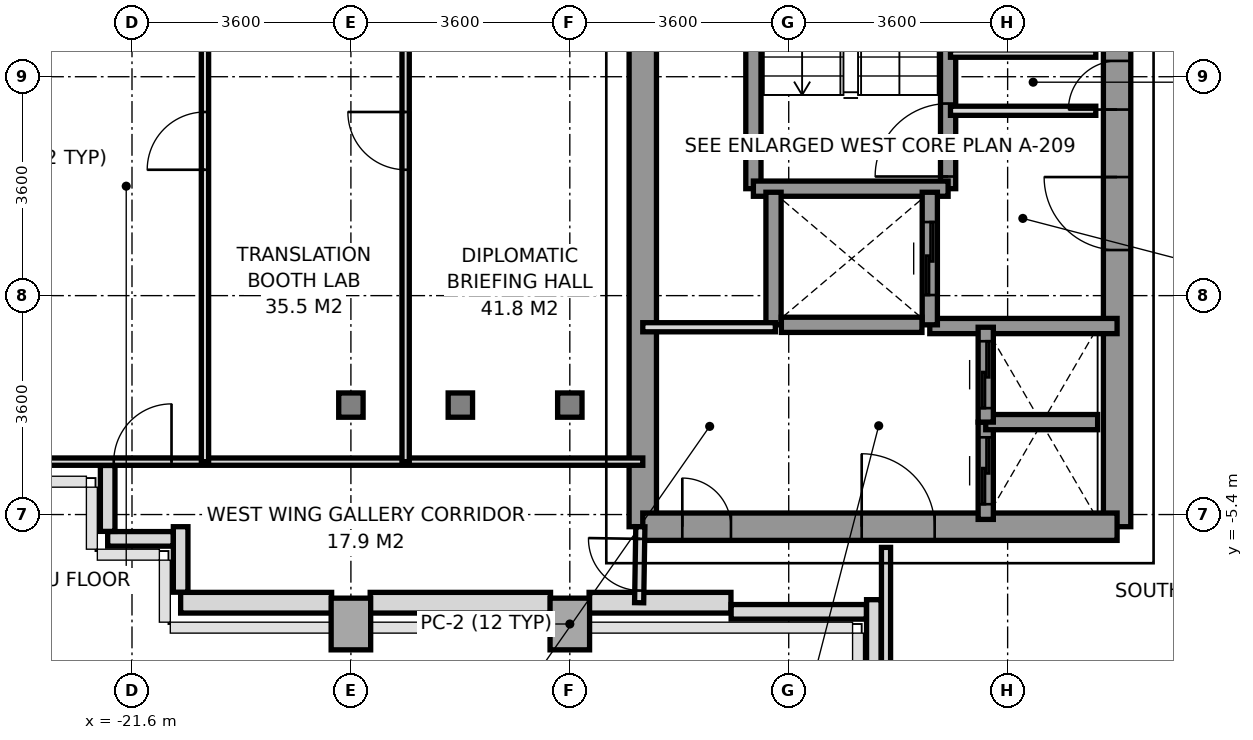
"""IFC4 building model, lengths in metres.
Left out: names, types, materials, properties, quantities, classifications, styles, units other than length and angle.
Written with IfcOpenShell. Run it as: python <this file> out.ifc"""

import sys

from ifc_helpers import new_model, si_unit, direction, frame, frame_2d, origin, origin_2d, place, context, subcontext, project, spatial, rectangle, i_section, extrude, source, transform, mapped, element, fill, save


model = new_model("IFC4")
c1 = context("Model", 3, precision=1e-05, world=origin(), true_north=direction((0.0, 1.0)))
c2 = subcontext(c1, "Body", "Model", "MODEL_VIEW")
j1 = project(units=[si_unit("LENGTHUNIT", "METRE"), si_unit("PLANEANGLEUNIT", "RADIAN")], contexts=[c1])
p1 = place(None, origin())
s1 = spatial("IfcSite", under=j1, at=p1, CompositionType="ELEMENT")
p2 = place(p1, origin())
s2 = spatial("IfcBuilding", under=s1, at=p2, CompositionType="ELEMENT")
p3 = place(p2, frame((0.0, 0.0, 117.6)))
s3 = spatial("IfcBuildingStorey", under=s2, at=p3, CompositionType="ELEMENT", Elevation=117.6)
m1 = source(origin(), c2, "Body", "SweptSolid", [
    extrude(rectangle(XDim=0.65, YDim=0.85, at=origin_2d()), origin(), (0.0, 0.0, 1.0), 3.2),
])
p4 = place(p3, frame((-18.0, -7.2, 0.0), z_axis=(0.0, 0.0, 1.0), x_axis=(1.0, 0.0, 0.0)))
e1 = element("IfcColumn", 1, at=p4, inside=s3, PredefinedType="COLUMN", context=c2, shape_type="MappedRepresentation", body=[
    mapped(m1, transform((0.0, 0.0, 0.0), x_axis=(1.0, 0.0, 0.0), y_axis=(0.0, 1.0, 0.0), z_axis=(0.0, 0.0, 1.0), scale=1.0)),
])
m2 = source(origin(), c2, "Body", "SweptSolid", [
    extrude(i_section(OverallWidth=0.401, OverallDepth=0.399, WebThickness=0.02, FlangeThickness=0.032, at=origin_2d()), origin(), (0.0, 0.0, 1.0), 3.2),
])
for number, where, z_axis, x_axis in (
    (2, (-18.0, -3.6, 0.0), (0.0, 0.0, 1.0), (1.0, 0.0, 0.0)),
    (3, (-16.2, -3.6, 0.0), (0.0, 0.0, 1.0), (1.0, 0.0, 0.0)),
):
    element("IfcColumn", number, at=place(p3, frame(where, z_axis=z_axis, x_axis=x_axis)), inside=s3, PredefinedType="COLUMN", context=c2, shape_type="MappedRepresentation", body=[
        mapped(m2, transform((0.0, 0.0, 0.0), x_axis=(1.0, 0.0, 0.0), y_axis=(0.0, 1.0, 0.0), z_axis=(0.0, 0.0, 1.0), scale=1.0)),
    ])
p5 = place(p3, frame((-14.4, -7.2, 0.0), z_axis=(0.0, 0.0, 1.0), x_axis=(1.0, 0.0, 0.0)))
e4 = element("IfcColumn", 4, at=p5, inside=s3, PredefinedType="COLUMN", context=c2, shape_type="MappedRepresentation", body=[
    mapped(m1, transform((0.0, 0.0, 0.0), x_axis=(1.0, 0.0, 0.0), y_axis=(0.0, 1.0, 0.0), z_axis=(0.0, 0.0, 1.0), scale=1.0)),
])
p6 = place(p3, frame((-14.4, -3.6, 0.0), z_axis=(0.0, 0.0, 1.0), x_axis=(1.0, 0.0, 0.0)))
e5 = element("IfcColumn", 5, at=p6, inside=s3, PredefinedType="COLUMN", context=c2, shape_type="MappedRepresentation", body=[
    mapped(m2, transform((0.0, 0.0, 0.0), x_axis=(1.0, 0.0, 0.0), y_axis=(0.0, 1.0, 0.0), z_axis=(0.0, 0.0, 1.0), scale=1.0)),
])
p7 = place(p3, frame((-20.8, -6.85, 0.0), z_axis=(0.0, 0.0, 1.0), x_axis=(1.0, 0.0, 0.0)))
e6 = element("IfcWall", 6, at=p7, inside=s3, PredefinedType="SOLIDWALL", context=c2, shape_type="SweptSolid", body=[
    extrude(rectangle(XDim=2.483, YDim=0.34, at=frame_2d((1.242, 0.0))), origin(), (0.0, 0.0, 1.0), 3.2),
])
p8 = place(p3, frame((-17.683, -6.85, 0.0), z_axis=(0.0, 0.0, 1.0), x_axis=(1.0, 0.0, 0.0)))
e7 = element("IfcWall", 7, at=p8, inside=s3, PredefinedType="SOLIDWALL", context=c2, shape_type="SweptSolid", body=[
    extrude(rectangle(XDim=2.966, YDim=0.34, at=frame_2d((1.483, 0.0))), origin(), (0.0, 0.0, 1.0), 2.45),
])
p9 = place(p3, frame((-14.083, -6.85, 0.0), z_axis=(0.0, 0.0, 1.0), x_axis=(1.0, 0.0, 0.0)))
e8 = element("IfcWall", 8, at=p9, inside=s3, PredefinedType="SOLIDWALL", context=c2, shape_type="SweptSolid", body=[
    extrude(rectangle(XDim=2.333, YDim=0.34, at=frame_2d((1.167, 0.0))), origin(), (0.0, 0.0, 1.0), 3.2),
])
p10 = place(p3, frame((-9.4, -8.472, 0.0), z_axis=(0.0, 0.0, 1.0), x_axis=(0.0, 1.0, 0.0)))
e9 = element("IfcWall", 9, at=p10, inside=s3, PredefinedType="PARAPET", context=c2, shape_type="SweptSolid", body=[
    extrude(rectangle(XDim=1.672, YDim=0.24, at=frame_2d((0.836, 0.0))), origin(), (0.0, 0.0, 1.0), 1.15),
])
p11 = place(p3, frame((-9.523, -7.0, 0.0), z_axis=(0.0, 0.0, 1.0), x_axis=(-1.0, 0.0, 0.0)))
e10 = element("IfcWall", 10, at=p11, inside=s3, PredefinedType="PARAPET", context=c2, shape_type="SweptSolid", body=[
    extrude(rectangle(XDim=2.224, YDim=0.24, at=frame_2d((1.112, 0.0))), origin(), (0.0, 0.0, 1.0), 1.15),
])
for number, where, z_axis, x_axis in (
    (11, (-20.8, -6.677, 0.0), (0.0, 0.0, 1.0), (0.0, 1.0, 0.0)),
    (12, (-20.923, -5.8, 0.0), (0.0, 0.0, 1.0), (-1.0, 0.0, 0.0)),
):
    element("IfcWall", number, at=place(p3, frame(where, z_axis=z_axis, x_axis=x_axis)), inside=s3, PredefinedType="PARAPET", context=c2, shape_type="SweptSolid", body=[
        extrude(rectangle(XDim=1.077, YDim=0.24, at=frame_2d((0.539, 0.0))), origin(), (0.0, 0.0, 1.0), 1.15),
    ])
p12 = place(p3, frame((-22.0, -5.677, 0.0), z_axis=(0.0, 0.0, 1.0), x_axis=(0.0, 1.0, 0.0)))
e13 = element("IfcWall", 13, at=p12, inside=s3, PredefinedType="PARAPET", context=c2, shape_type="SweptSolid", body=[
    extrude(rectangle(XDim=1.084, YDim=0.24, at=frame_2d((0.542, 0.0))), origin(), (0.0, 0.0, 1.0), 1.15),
])
p13 = place(p3, frame((-13.2, -5.6, 0.0), z_axis=(0.0, 0.0, 1.0), x_axis=(0.0, 1.0, 0.0)))
e14 = element("IfcWall", 14, at=p13, inside=s3, PredefinedType="SHEAR", context=c2, shape_type="SweptSolid", body=[
    extrude(rectangle(XDim=11.2, YDim=0.45, at=frame_2d((5.6, 0.0))), origin(), (0.0, 0.0, 1.0), 3.2),
])
p14 = place(p3, frame((-5.4, -5.6, 0.0), z_axis=(0.0, 0.0, 1.0), x_axis=(0.0, 1.0, 0.0)))
e15 = element("IfcWall", 15, at=p14, inside=s3, PredefinedType="SHEAR", context=c2, shape_type="SweptSolid", body=[
    extrude(rectangle(XDim=12.5, YDim=0.45, at=frame_2d((6.25, 0.0))), origin(), (0.0, 0.0, 1.0), 3.2),
])
p15 = place(p14, frame((4.55, 0.0, 0.0)))
e16 = element("IfcOpeningElement", 16, at=p15, cuts=e15, PredefinedType="OPENING", context=c2, shape_type="SweptSolid", body=[
    extrude(rectangle(XDim=1.2, YDim=2.2, at=frame_2d((0.6, 1.1))), frame((0.0, 0.235, 0.0), z_axis=(0.0, -1.0, 0.0), x_axis=(1.0, 0.0, 0.0)), (0.0, 0.0, 1.0), 0.47),
])
p16 = place(p14, frame((6.86, 0.0, 0.0)))
e17 = element("IfcOpeningElement", 17, at=p16, cuts=e15, PredefinedType="OPENING", context=c2, shape_type="SweptSolid", body=[
    extrude(rectangle(XDim=0.8, YDim=2.1, at=frame_2d((0.4, 1.05))), frame((0.0, 0.235, 0.0), z_axis=(0.0, -1.0, 0.0), x_axis=(1.0, 0.0, 0.0)), (0.0, 0.0, 1.0), 0.47),
])
p17 = place(p14, frame((7.88, 0.0, 0.0)))
e18 = element("IfcOpeningElement", 18, at=p17, cuts=e15, PredefinedType="OPENING", context=c2, shape_type="SweptSolid", body=[
    extrude(rectangle(XDim=0.8, YDim=2.1, at=frame_2d((0.4, 1.05))), frame((0.0, 0.235, 0.0), z_axis=(0.0, -1.0, 0.0), x_axis=(1.0, 0.0, 0.0)), (0.0, 0.0, 1.0), 0.47),
])
p18 = place(p3, frame((-13.2, -5.6, 0.0), z_axis=(0.0, 0.0, 1.0), x_axis=(1.0, 0.0, 0.0)))
e19 = element("IfcWall", 19, at=p18, inside=s3, PredefinedType="SHEAR", context=c2, shape_type="SweptSolid", body=[
    extrude(rectangle(XDim=7.8, YDim=0.45, at=frame_2d((3.9, 0.0))), origin(), (0.0, 0.0, 1.0), 3.2),
])
p19 = place(p18, frame((3.6, 0.0, 0.0)))
e20 = element("IfcOpeningElement", 20, at=p19, cuts=e19, PredefinedType="OPENING", context=c2, shape_type="SweptSolid", body=[
    extrude(rectangle(XDim=1.2, YDim=2.2, at=frame_2d((0.6, 1.1))), frame((0.0, 0.235, 0.0), z_axis=(0.0, -1.0, 0.0), x_axis=(1.0, 0.0, 0.0)), (0.0, 0.0, 1.0), 0.47),
])
p20 = place(p18, frame((0.65, 0.0, 0.0)))
e21 = element("IfcOpeningElement", 21, at=p20, cuts=e19, PredefinedType="OPENING", context=c2, shape_type="SweptSolid", body=[
    extrude(rectangle(XDim=0.8, YDim=2.1, at=frame_2d((0.4, 1.05))), frame((0.0, 0.235, 0.0), z_axis=(0.0, -1.0, 0.0), x_axis=(1.0, 0.0, 0.0)), (0.0, 0.0, 1.0), 0.47),
])
p21 = place(p3, frame((-8.48, -2.3, 0.0), z_axis=(0.0, 0.0, 1.0), x_axis=(1.0, 0.0, 0.0)))
e22 = element("IfcWall", 22, at=p21, inside=s3, PredefinedType="SOLIDWALL", context=c2, shape_type="SweptSolid", body=[
    extrude(rectangle(XDim=3.08, YDim=0.25, at=frame_2d((1.54, 0.0))), origin(), (0.0, 0.0, 1.0), 3.2),
])
p22 = place(p3, frame((-8.179, -0.041, 0.0), z_axis=(0.0, 0.0, 1.0), x_axis=(0.0, 1.0, 0.0)))
e23 = element("IfcWall", 23, at=p22, inside=s3, PredefinedType="SOLIDWALL", context=c2, shape_type="SweptSolid", body=[
    extrude(rectangle(XDim=6.941, YDim=0.25, at=frame_2d((3.47, 0.0))), origin(), (0.0, 0.0, 1.0), 3.2),
])
p23 = place(p22, frame((0.2, 0.0, 0.0)))
e24 = element("IfcOpeningElement", 24, at=p23, cuts=e23, PredefinedType="OPENING", context=c2, shape_type="SweptSolid", body=[
    extrude(rectangle(XDim=1.2, YDim=2.2, at=frame_2d((0.6, 1.1))), frame((0.0, 0.135, 0.0), z_axis=(0.0, -1.0, 0.0), x_axis=(1.0, 0.0, 0.0)), (0.0, 0.0, 1.0), 0.27),
])
p24 = place(p3, frame((-11.381, -0.041, 0.0), z_axis=(0.0, 0.0, 1.0), x_axis=(0.0, 1.0, 0.0)))
e25 = element("IfcWall", 25, at=p24, inside=s3, PredefinedType="SOLIDWALL", context=c2, shape_type="SweptSolid", body=[
    extrude(rectangle(XDim=6.941, YDim=0.25, at=frame_2d((3.47, 0.0))), origin(), (0.0, 0.0, 1.0), 3.2),
])
p25 = place(p3, frame((-11.381, -0.041, 0.0), z_axis=(0.0, 0.0, 1.0), x_axis=(1.0, 0.0, 0.0)))
e26 = element("IfcWall", 26, at=p25, inside=s3, PredefinedType="SOLIDWALL", context=c2, shape_type="SweptSolid", body=[
    extrude(rectangle(XDim=3.202, YDim=0.25, at=frame_2d((1.601, 0.0))), origin(), (0.0, 0.0, 1.0), 3.2),
])
p26 = place(p3, frame((-11.05, -2.28, 0.0), z_axis=(0.0, 0.0, 1.0), x_axis=(0.0, 1.0, 0.0)))
e27 = element("IfcWall", 27, at=p26, inside=s3, PredefinedType="SOLIDWALL", context=c2, shape_type="SweptSolid", body=[
    extrude(rectangle(XDim=2.18, YDim=0.25, at=frame_2d((1.09, 0.0))), origin(), (0.0, 0.0, 1.0), 3.2),
])
p27 = place(p3, frame((-8.48, -2.28, 0.0), z_axis=(0.0, 0.0, 1.0), x_axis=(0.0, 1.0, 0.0)))
e28 = element("IfcWall", 28, at=p27, inside=s3, PredefinedType="SOLIDWALL", context=c2, shape_type="SweptSolid", body=[
    extrude(rectangle(XDim=2.18, YDim=0.25, at=frame_2d((1.09, 0.0))), origin(), (0.0, 0.0, 1.0), 3.2),
])
p28 = place(p27, frame((0.49, 0.0, 0.0)))
e29 = element("IfcOpeningElement", 29, at=p28, cuts=e28, PredefinedType="OPENING", context=c2, shape_type="SweptSolid", body=[
    extrude(rectangle(XDim=1.2, YDim=2.2, at=frame_2d((0.6, 1.1))), frame((0.0, 0.135, 0.0), z_axis=(0.0, -1.0, 0.0), x_axis=(1.0, 0.0, 0.0)), (0.0, 0.0, 1.0), 0.27),
])
p29 = place(p3, frame((-10.921, -2.28, 0.0), z_axis=(0.0, 0.0, 1.0), x_axis=(1.0, 0.0, 0.0)))
e30 = element("IfcWall", 30, at=p29, inside=s3, PredefinedType="SOLIDWALL", context=c2, shape_type="SweptSolid", body=[
    extrude(rectangle(XDim=2.312, YDim=0.25, at=frame_2d((1.156, 0.0))), origin(), (0.0, 0.0, 1.0), 3.2),
])
p30 = place(p3, frame((-7.56, -5.48, 0.0), z_axis=(0.0, 0.0, 1.0), x_axis=(0.0, 1.0, 0.0)))
e31 = element("IfcWall", 31, at=p30, inside=s3, PredefinedType="SOLIDWALL", context=c2, shape_type="SweptSolid", body=[
    extrude(rectangle(XDim=1.6, YDim=0.25, at=frame_2d((0.8, 0.0))), origin(), (0.0, 0.0, 1.0), 3.2),
])
p31 = place(p30, frame((0.25, 0.0, 0.0)))
e32 = element("IfcOpeningElement", 32, at=p31, cuts=e31, PredefinedType="OPENING", context=c2, shape_type="SweptSolid", body=[
    extrude(rectangle(XDim=1.1, YDim=2.2, at=frame_2d((0.55, 1.1))), frame((0.0, 0.135, 0.0), z_axis=(0.0, -1.0, 0.0), x_axis=(1.0, 0.0, 0.0)), (0.0, 0.0, 1.0), 0.27),
])
p32 = place(p3, frame((-7.56, -3.88, 0.0), z_axis=(0.0, 0.0, 1.0), x_axis=(1.0, 0.0, 0.0)))
e33 = element("IfcWall", 33, at=p32, inside=s3, PredefinedType="SOLIDWALL", context=c2, shape_type="SweptSolid", body=[
    extrude(rectangle(XDim=1.84, YDim=0.25, at=frame_2d((0.92, 0.0))), origin(), (0.0, 0.0, 1.0), 3.2),
])
p33 = place(p3, frame((-7.56, -3.88, 0.0), z_axis=(0.0, 0.0, 1.0), x_axis=(0.0, 1.0, 0.0)))
e34 = element("IfcWall", 34, at=p33, inside=s3, PredefinedType="SOLIDWALL", context=c2, shape_type="SweptSolid", body=[
    extrude(rectangle(XDim=1.56, YDim=0.25, at=frame_2d((0.78, 0.0))), origin(), (0.0, 0.0, 1.0), 3.2),
])
p34 = place(p33, frame((0.23, 0.0, 0.0)))
e35 = element("IfcOpeningElement", 35, at=p34, cuts=e34, PredefinedType="OPENING", context=c2, shape_type="SweptSolid", body=[
    extrude(rectangle(XDim=1.1, YDim=2.2, at=frame_2d((0.55, 1.1))), frame((0.0, 0.135, 0.0), z_axis=(0.0, -1.0, 0.0), x_axis=(1.0, 0.0, 0.0)), (0.0, 0.0, 1.0), 0.27),
])
p35 = place(p3, frame((-8.14, 1.24, 0.0), z_axis=(0.0, 0.0, 1.0), x_axis=(1.0, 0.0, 0.0)))
e36 = element("IfcWall", 36, at=p35, inside=s3, PredefinedType="PARTITIONING", context=c2, shape_type="SweptSolid", body=[
    extrude(rectangle(XDim=2.39, YDim=0.15, at=frame_2d((1.195, 0.0))), origin(), (0.0, 0.0, 1.0), 2.3),
])
p36 = place(p3, frame((-8.14, 2.18, 0.0), z_axis=(0.0, 0.0, 1.0), x_axis=(1.0, 0.0, 0.0)))
e37 = element("IfcWall", 37, at=p36, inside=s3, PredefinedType="PARTITIONING", context=c2, shape_type="SweptSolid", body=[
    extrude(rectangle(XDim=2.39, YDim=0.12, at=frame_2d((1.195, 0.0))), origin(), (0.0, 0.0, 1.0), 2.3),
])
p37 = place(p3, frame((-13.2, -2.32, 0.0), z_axis=(0.0, 0.0, 1.0), x_axis=(1.0, 0.0, 0.0)))
e38 = element("IfcWall", 38, at=p37, inside=s3, PredefinedType="PARTITIONING", context=c2, shape_type="SweptSolid", body=[
    extrude(rectangle(XDim=2.18, YDim=0.15, at=frame_2d((1.09, 0.0))), origin(), (0.0, 0.0, 1.0), 3.2),
])
p38 = place(p3, frame((-9.2, -15.68, 0.0), z_axis=(0.0, 0.0, 1.0), x_axis=(0.0, 1.0, 0.0)))
e39 = element("IfcWall", 39, at=p38, inside=s3, PredefinedType="PARTITIONING", context=c2, shape_type="SweptSolid", body=[
    extrude(rectangle(XDim=9.74, YDim=0.15, at=frame_2d((4.87, 0.0))), origin(), (0.0, 0.0, 1.0), 2.7),
])
p39 = place(p3, frame((-13.26, -6.85, 0.0), z_axis=(0.0, 0.0, 1.0), x_axis=(0.016013571389, 0.999871774545, 0.0)))
e40 = element("IfcWall", 40, at=p39, inside=s3, PredefinedType="PARTITIONING", context=c2, shape_type="SweptSolid", body=[
    extrude(rectangle(XDim=1.25, YDim=0.15, at=frame_2d((0.625, 0.0))), origin(), (0.0, 0.0, 1.0), 3.2),
])
p40 = place(p39, frame((0.2, 0.0, 0.0)))
e41 = element("IfcOpeningElement", 41, at=p40, cuts=e40, PredefinedType="OPENING", context=c2, shape_type="SweptSolid", body=[
    extrude(rectangle(XDim=0.85, YDim=2.1, at=frame_2d((0.425, 1.05))), frame((0.0, 0.085, 0.0), z_axis=(0.0, -1.0, 0.0), x_axis=(1.0, 0.0, 0.0)), (0.0, 0.0, 1.0), 0.17),
])
p41 = place(p3, frame((-23.3, -4.53, 0.0), z_axis=(0.0, 0.0, 1.0), x_axis=(1.0, 0.0, 0.0)))
e42 = element("IfcWall", 42, at=p41, inside=s3, PredefinedType="PARTITIONING", context=c2, shape_type="SweptSolid", body=[
    extrude(rectangle(XDim=10.1, YDim=0.12, at=frame_2d((5.05, 0.0))), origin(), (0.0, 0.0, 1.0), 2.76),
])
p42 = place(p41, frame((1.4, 0.0, 0.0)))
e43 = element("IfcOpeningElement", 43, at=p42, cuts=e42, PredefinedType="OPENING", context=c2, shape_type="SweptSolid", body=[
    extrude(rectangle(XDim=0.95, YDim=2.15, at=frame_2d((0.475, 1.075))), frame((0.0, 0.07, 0.0), z_axis=(0.0, -1.0, 0.0), x_axis=(1.0, 0.0, 0.0)), (0.0, 0.0, 1.0), 0.14),
])
p43 = place(p3, frame((-20.4, -4.53, 0.0), z_axis=(0.0, 0.0, 1.0), x_axis=(0.0, 1.0, 0.0)))
e44 = element("IfcWall", 44, at=p43, inside=s3, PredefinedType="PARTITIONING", context=c2, shape_type="SweptSolid", body=[
    extrude(rectangle(XDim=11.38, YDim=0.12, at=frame_2d((5.69, 0.0))), origin(), (0.0, 0.0, 1.0), 2.7),
])
p44 = place(p43, frame((4.8, 0.0, 0.0)))
e45 = element("IfcOpeningElement", 45, at=p44, cuts=e44, PredefinedType="OPENING", context=c2, shape_type="SweptSolid", body=[
    extrude(rectangle(XDim=0.95, YDim=2.15, at=frame_2d((0.475, 1.075))), frame((0.0, 0.07, 0.0), z_axis=(0.0, -1.0, 0.0), x_axis=(1.0, 0.0, 0.0)), (0.0, 0.0, 1.0), 0.14),
])
p45 = place(p3, frame((-17.1, -4.53, 0.0), z_axis=(0.0, 0.0, 1.0), x_axis=(0.0, 1.0, 0.0)))
e46 = element("IfcWall", 46, at=p45, inside=s3, PredefinedType="PARTITIONING", context=c2, shape_type="SweptSolid", body=[
    extrude(rectangle(XDim=11.38, YDim=0.12, at=frame_2d((5.69, 0.0))), origin(), (0.0, 0.0, 1.0), 2.7),
])
p46 = place(p45, frame((4.8, 0.0, 0.0)))
e47 = element("IfcOpeningElement", 47, at=p46, cuts=e46, PredefinedType="OPENING", context=c2, shape_type="SweptSolid", body=[
    extrude(rectangle(XDim=0.95, YDim=2.15, at=frame_2d((0.475, 1.075))), frame((0.0, 0.07, 0.0), z_axis=(0.0, -1.0, 0.0), x_axis=(1.0, 0.0, 0.0)), (0.0, 0.0, 1.0), 0.14),
])
m3 = source(origin(), c2, "Body", "SweptSolid", [
    extrude(rectangle(XDim=1.2, YDim=2.2, at=frame_2d((0.6, 1.1))), frame((0.0, 0.025, 0.0), z_axis=(0.0, -1.0, 0.0), x_axis=(1.0, 0.0, 0.0)), (0.0, 0.0, 1.0), 0.05),
])
p47 = place(p23, origin())
e48 = element("IfcDoor", 48, at=p47, inside=s3, OperationType="SINGLE_SWING_LEFT", PredefinedType="DOOR", context=c2, shape_type="MappedRepresentation", body=[
    mapped(m3, transform((0.0, 0.0, 0.0), x_axis=(1.0, 0.0, 0.0), y_axis=(0.0, 1.0, 0.0), z_axis=(0.0, 0.0, 1.0), scale=1.0)),
])
fill(e24, e48)
p48 = place(p15, origin())
e49 = element("IfcDoor", 49, at=p48, inside=s3, OperationType="SINGLE_SWING_RIGHT", PredefinedType="DOOR", context=c2, shape_type="MappedRepresentation", body=[
    mapped(m3, transform((0.0, 0.0, 0.0), x_axis=(1.0, 0.0, 0.0), y_axis=(0.0, 1.0, 0.0), z_axis=(0.0, 0.0, 1.0), scale=1.0)),
])
fill(e16, e49)
p49 = place(p19, origin())
e50 = element("IfcDoor", 50, at=p49, inside=s3, OperationType="SINGLE_SWING_LEFT", PredefinedType="DOOR", context=c2, shape_type="MappedRepresentation", body=[
    mapped(m3, transform((0.0, 0.0, 0.0), x_axis=(1.0, 0.0, 0.0), y_axis=(0.0, 1.0, 0.0), z_axis=(0.0, 0.0, 1.0), scale=1.0)),
])
fill(e20, e50)
m4 = source(origin(), c2, "Body", "SweptSolid", [
    extrude(rectangle(XDim=0.8, YDim=2.1, at=frame_2d((0.4, 1.05))), frame((0.0, 0.025, 0.0), z_axis=(0.0, -1.0, 0.0), x_axis=(1.0, 0.0, 0.0)), (0.0, 0.0, 1.0), 0.05),
])
p50 = place(p16, origin())
e51 = element("IfcDoor", 51, at=p50, inside=s3, OperationType="SINGLE_SWING_LEFT", PredefinedType="DOOR", context=c2, shape_type="MappedRepresentation", body=[
    mapped(m4, transform((0.0, 0.0, 0.0), x_axis=(1.0, 0.0, 0.0), y_axis=(0.0, 1.0, 0.0), z_axis=(0.0, 0.0, 1.0), scale=1.0)),
])
fill(e17, e51)
p51 = place(p20, origin())
e52 = element("IfcDoor", 52, at=p51, inside=s3, OperationType="SINGLE_SWING_LEFT", PredefinedType="DOOR", context=c2, shape_type="MappedRepresentation", body=[
    mapped(m4, transform((0.0, 0.0, 0.0), x_axis=(1.0, 0.0, 0.0), y_axis=(0.0, 1.0, 0.0), z_axis=(0.0, 0.0, 1.0), scale=1.0)),
])
fill(e21, e52)
p52 = place(p28, origin())
e53 = element("IfcDoor", 53, at=p52, inside=s3, OperationType="SLIDING_TO_RIGHT", PredefinedType="DOOR", context=c2, shape_type="MappedRepresentation", body=[
    mapped(m3, transform((0.0, 0.0, 0.0), x_axis=(1.0, 0.0, 0.0), y_axis=(0.0, 1.0, 0.0), z_axis=(0.0, 0.0, 1.0), scale=1.0)),
])
fill(e29, e53)
m5 = source(origin(), c2, "Body", "SweptSolid", [
    extrude(rectangle(XDim=1.1, YDim=2.2, at=frame_2d((0.55, 1.1))), frame((0.0, 0.025, 0.0), z_axis=(0.0, -1.0, 0.0), x_axis=(1.0, 0.0, 0.0)), (0.0, 0.0, 1.0), 0.05),
])
p53 = place(p31, origin())
e54 = element("IfcDoor", 54, at=p53, inside=s3, OperationType="SLIDING_TO_LEFT", PredefinedType="DOOR", context=c2, shape_type="MappedRepresentation", body=[
    mapped(m5, transform((0.0, 0.0, 0.0), x_axis=(1.0, 0.0, 0.0), y_axis=(0.0, 1.0, 0.0), z_axis=(0.0, 0.0, 1.0), scale=1.0)),
])
fill(e32, e54)
p54 = place(p34, origin())
e55 = element("IfcDoor", 55, at=p54, inside=s3, OperationType="SLIDING_TO_LEFT", PredefinedType="DOOR", context=c2, shape_type="MappedRepresentation", body=[
    mapped(m5, transform((0.0, 0.0, 0.0), x_axis=(1.0, 0.0, 0.0), y_axis=(0.0, 1.0, 0.0), z_axis=(0.0, 0.0, 1.0), scale=1.0)),
])
fill(e35, e55)
m6 = source(origin(), c2, "Body", "SweptSolid", [
    extrude(rectangle(XDim=0.85, YDim=2.1, at=frame_2d((0.425, 1.05))), frame((0.0, 0.025, 0.0), z_axis=(0.0, -1.0, 0.0), x_axis=(1.0, 0.0, 0.0)), (0.0, 0.0, 1.0), 0.05),
])
p55 = place(p40, origin())
e56 = element("IfcDoor", 56, at=p55, inside=s3, OperationType="SINGLE_SWING_RIGHT", PredefinedType="DOOR", context=c2, shape_type="MappedRepresentation", body=[
    mapped(m6, transform((0.0, 0.0, 0.0), x_axis=(1.0, 0.0, 0.0), y_axis=(0.0, 1.0, 0.0), z_axis=(0.0, 0.0, 1.0), scale=1.0)),
])
fill(e41, e56)
m7 = source(origin(), c2, "Body", "SweptSolid", [
    extrude(rectangle(XDim=0.95, YDim=2.15, at=frame_2d((0.475, 1.075))), frame((0.0, 0.025, 0.0), z_axis=(0.0, -1.0, 0.0), x_axis=(1.0, 0.0, 0.0)), (0.0, 0.0, 1.0), 0.05),
])
p56 = place(p42, origin())
e57 = element("IfcDoor", 57, at=p56, inside=s3, OperationType="SINGLE_SWING_RIGHT", PredefinedType="DOOR", context=c2, shape_type="MappedRepresentation", body=[
    mapped(m7, transform((0.0, 0.0, 0.0), x_axis=(1.0, 0.0, 0.0), y_axis=(0.0, 1.0, 0.0), z_axis=(0.0, 0.0, 1.0), scale=1.0)),
])
fill(e43, e57)
p57 = place(p44, origin())
e58 = element("IfcDoor", 58, at=p57, inside=s3, OperationType="SINGLE_SWING_LEFT", PredefinedType="DOOR", context=c2, shape_type="MappedRepresentation", body=[
    mapped(m7, transform((0.0, 0.0, 0.0), x_axis=(1.0, 0.0, 0.0), y_axis=(0.0, 1.0, 0.0), z_axis=(0.0, 0.0, 1.0), scale=1.0)),
])
fill(e45, e58)
p58 = place(p46, origin())
e59 = element("IfcDoor", 59, at=p58, inside=s3, OperationType="SINGLE_SWING_RIGHT", PredefinedType="DOOR", context=c2, shape_type="MappedRepresentation", body=[
    mapped(m7, transform((0.0, 0.0, 0.0), x_axis=(1.0, 0.0, 0.0), y_axis=(0.0, 1.0, 0.0), z_axis=(0.0, 0.0, 1.0), scale=1.0)),
])
fill(e47, e59)
save(model, sys.argv[1])
